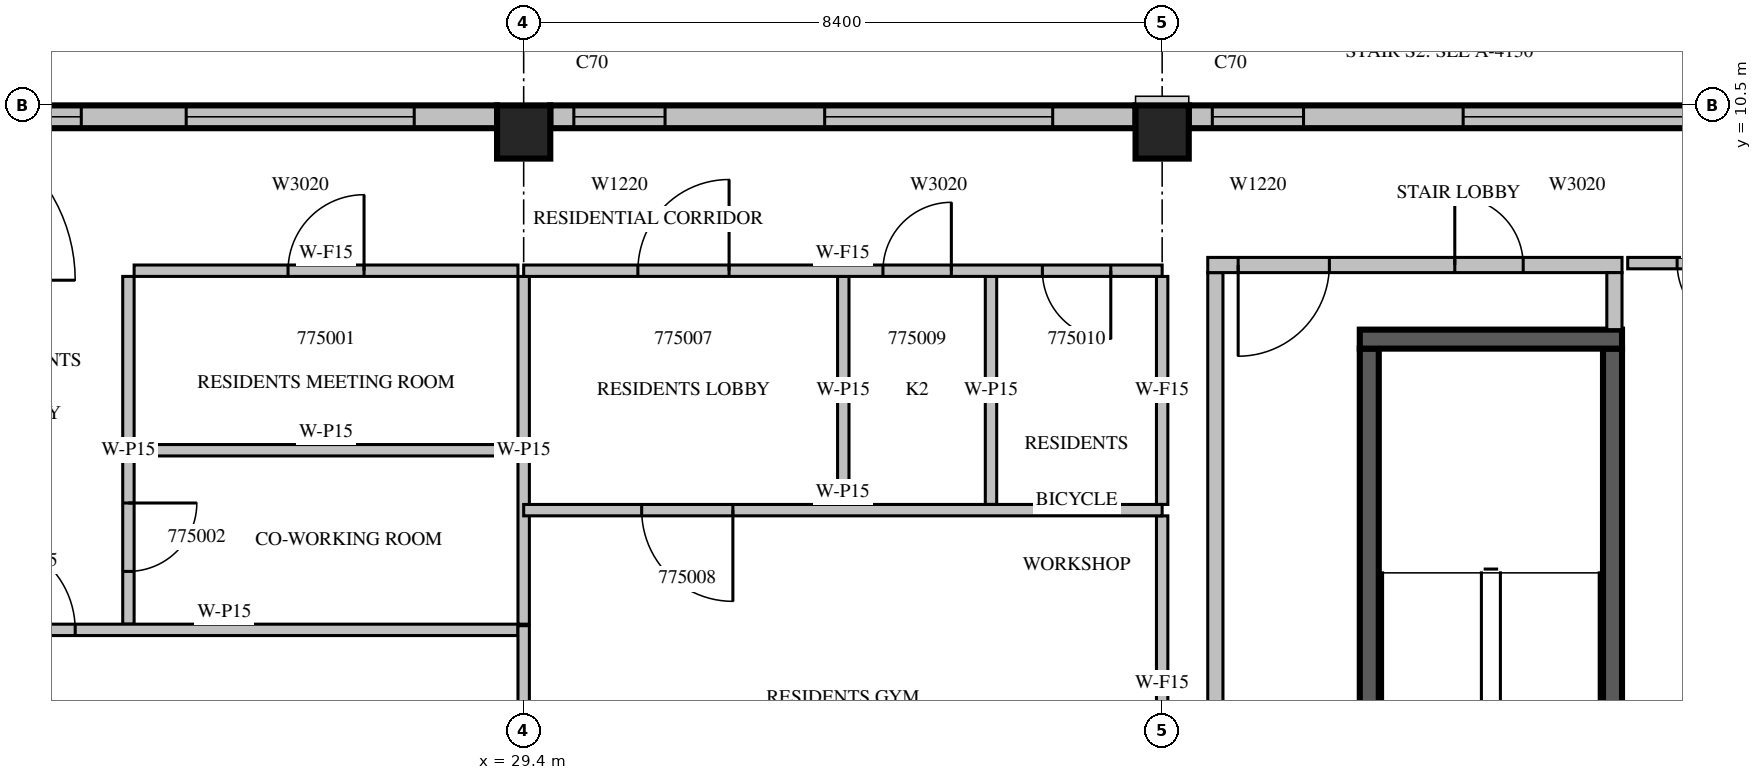
"""IFC4 building model, lengths in metres.
Left out: names, types, materials, properties, quantities, classifications, styles, units other than length and angle.
Written with IfcOpenShell. Run it as: python <this file> out.ifc"""

import sys

from ifc_helpers import new_model, si_unit, direction, frame, frame_2d, origin, origin_2d, place, context, subcontext, project, spatial, rectangle, extrude, source, transform, mapped, element, fill, save


model = new_model("IFC4")
c1 = context("Model", 3, precision=1e-05, world=origin(), true_north=direction((0.0, 1.0)))
c2 = subcontext(c1, "Body", "Model", "MODEL_VIEW")
j1 = project(units=[si_unit("LENGTHUNIT", "METRE"), si_unit("PLANEANGLEUNIT", "RADIAN")], contexts=[c1])
p1 = place(None, origin())
s1 = spatial("IfcSite", under=j1, at=p1, CompositionType="ELEMENT")
p2 = place(p1, origin())
s2 = spatial("IfcBuilding", under=s1, at=p2, CompositionType="ELEMENT")
p3 = place(p2, frame((0.0, 0.0, 323.0)))
s3 = spatial("IfcBuildingStorey", under=s2, at=p3, CompositionType="ELEMENT", Elevation=323.0)
m1 = source(origin(), c2, "Body", "SweptSolid", [
    extrude(rectangle(XDim=0.7, YDim=0.7, at=origin_2d()), origin(), (0.0, 0.0, 1.0), 3.5),
])
for number, where, z_axis, x_axis in (
    (1, (29.4, 10.15, 0.0), (0.0, 0.0, 1.0), (1.0, 0.0, 0.0)),
    (2, (37.8, 10.15, 0.0), (0.0, 0.0, 1.0), (1.0, 0.0, 0.0)),
):
    element("IfcColumn", number, at=place(p3, frame(where, z_axis=z_axis, x_axis=x_axis)), inside=s3, PredefinedType="COLUMN", context=c2, shape_type="MappedRepresentation", body=[
        mapped(m1, transform((0.0, 0.0, 0.0), scale=1.0)),
    ])
m2 = source(origin(), c2, "Body", "SweptSolid", [
    extrude(rectangle(XDim=7.7, YDim=0.3, at=frame_2d((3.85, 0.0))), origin(), (0.0, 0.0, 1.0), 3.1),
])
p4 = place(p3, frame((45.85, 10.35, 0.0), z_axis=(0.0, 0.0, 1.0), x_axis=(-1.0, 0.0, 0.0)))
e3 = element("IfcWall", 3, at=p4, inside=s3, PredefinedType="STANDARD", context=c2, shape_type="MappedRepresentation", body=[
    mapped(m2, transform((0.0, 0.0, 0.0), scale=1.0)),
])
m3 = source(origin(), c2, "Body", "SweptSolid", [
    extrude(rectangle(XDim=3.0, YDim=2.0, at=frame_2d((1.5, 1.0))), frame((0.0, 0.16, 0.0), z_axis=(0.0, -1.0, 0.0), x_axis=(1.0, 0.0, 0.0)), (0.0, 0.0, 1.0), 0.32),
])
p5 = place(p4, frame((1.09, 0.0, 0.6)))
e4 = element("IfcOpeningElement", 4, at=p5, cuts=e3, PredefinedType="OPENING", context=c2, shape_type="MappedRepresentation", body=[
    mapped(m3, transform((0.0, 0.0, 0.0), scale=1.0)),
])
m4 = source(origin(), c2, "Body", "SweptSolid", [
    extrude(rectangle(XDim=1.2, YDim=2.0, at=frame_2d((0.6, 1.0))), frame((0.0, 0.16, 0.0), z_axis=(0.0, -1.0, 0.0), x_axis=(1.0, 0.0, 0.0)), (0.0, 0.0, 1.0), 0.32),
])
p6 = place(p4, frame((6.19, 0.0, 0.6)))
e5 = element("IfcOpeningElement", 5, at=p6, cuts=e3, PredefinedType="OPENING", context=c2, shape_type="MappedRepresentation", body=[
    mapped(m4, transform((0.0, 0.0, 0.0), scale=1.0)),
])
p7 = place(p3, frame((37.45, 10.35, 0.0), z_axis=(0.0, 0.0, 1.0), x_axis=(-1.0, 0.0, 0.0)))
e6 = element("IfcWall", 6, at=p7, inside=s3, PredefinedType="STANDARD", context=c2, shape_type="MappedRepresentation", body=[
    mapped(m2, transform((0.0, 0.0, 0.0), scale=1.0)),
])
p8 = place(p7, frame((1.09, 0.0, 0.6)))
e7 = element("IfcOpeningElement", 7, at=p8, cuts=e6, PredefinedType="OPENING", context=c2, shape_type="MappedRepresentation", body=[
    mapped(m3, transform((0.0, 0.0, 0.0), scale=1.0)),
])
p9 = place(p7, frame((6.19, 0.0, 0.6)))
e8 = element("IfcOpeningElement", 8, at=p9, cuts=e6, PredefinedType="OPENING", context=c2, shape_type="MappedRepresentation", body=[
    mapped(m4, transform((0.0, 0.0, 0.0), scale=1.0)),
])
m5 = source(origin(), c2, "Body", "SweptSolid", [
    extrude(rectangle(XDim=7.45, YDim=0.3, at=frame_2d((3.725, 0.0))), origin(), (0.0, 0.0, 1.0), 3.1),
])
p10 = place(p3, frame((29.05, 10.35, 0.0), z_axis=(0.0, 0.0, 1.0), x_axis=(-1.0, 0.0, 0.0)))
e9 = element("IfcWall", 9, at=p10, inside=s3, PredefinedType="STANDARD", context=c2, shape_type="MappedRepresentation", body=[
    mapped(m5, transform((0.0, 0.0, 0.0), scale=1.0)),
])
p11 = place(p10, frame((1.09, 0.0, 0.6)))
e10 = element("IfcOpeningElement", 10, at=p11, cuts=e9, PredefinedType="OPENING", context=c2, shape_type="MappedRepresentation", body=[
    mapped(m3, transform((0.0, 0.0, 0.0), scale=1.0)),
])
m6 = source(origin(), c2, "Body", "SweptSolid", [
    extrude(rectangle(XDim=1.8, YDim=2.0, at=frame_2d((0.9, 1.0))), frame((0.0, 0.16, 0.0), z_axis=(0.0, -1.0, 0.0), x_axis=(1.0, 0.0, 0.0)), (0.0, 0.0, 1.0), 0.32),
])
p12 = place(p10, frame((5.47, 0.0, 0.6)))
e11 = element("IfcOpeningElement", 11, at=p12, cuts=e9, PredefinedType="OPENING", context=c2, shape_type="MappedRepresentation", body=[
    mapped(m6, transform((0.0, 0.0, 0.0), scale=1.0)),
])
m7 = source(origin(), c2, "Body", "SweptSolid", [
    extrude(rectangle(XDim=7.0, YDim=0.25, at=frame_2d((3.5, 0.0))), origin(), (0.0, 0.0, 1.0), 3.1),
])
p13 = place(p3, frame((40.525, 0.3, 0.0), z_axis=(0.0, 0.0, 1.0), x_axis=(0.0, 1.0, 0.0)))
e12 = element("IfcWall", 12, at=p13, inside=s3, PredefinedType="SOLIDWALL", context=c2, shape_type="MappedRepresentation", body=[
    mapped(m7, transform((0.0, 0.0, 0.0), scale=1.0)),
])
m8 = source(origin(), c2, "Body", "SweptSolid", [
    extrude(rectangle(XDim=1.1, YDim=2.1, at=frame_2d((0.55, 1.05))), frame((0.0, 0.135, 0.0), z_axis=(0.0, -1.0, 0.0), x_axis=(1.0, 0.0, 0.0)), (0.0, 0.0, 1.0), 0.27),
])
p14 = place(p13, frame((0.55, 0.0, 0.0)))
e13 = element("IfcOpeningElement", 13, at=p14, cuts=e12, PredefinedType="OPENING", context=c2, shape_type="MappedRepresentation", body=[
    mapped(m8, transform((0.0, 0.0, 0.0), scale=1.0)),
])
p15 = place(p3, frame((43.725, 0.3, 0.0), z_axis=(0.0, 0.0, 1.0), x_axis=(0.0, 1.0, 0.0)))
e14 = element("IfcWall", 14, at=p15, inside=s3, PredefinedType="SOLIDWALL", context=c2, shape_type="MappedRepresentation", body=[
    mapped(m7, transform((0.0, 0.0, 0.0), scale=1.0)),
])
m9 = source(origin(), c2, "Body", "SweptSolid", [
    extrude(rectangle(XDim=3.45, YDim=0.25, at=frame_2d((1.725, 0.0))), origin(), (0.0, 0.0, 1.0), 3.1),
])
p16 = place(p3, frame((40.4, 7.425, 0.0), z_axis=(0.0, 0.0, 1.0), x_axis=(1.0, 0.0, 0.0)))
e15 = element("IfcWall", 15, at=p16, inside=s3, PredefinedType="SOLIDWALL", context=c2, shape_type="MappedRepresentation", body=[
    mapped(m9, transform((0.0, 0.0, 0.0), scale=1.0)),
])
m10 = source(origin(), c2, "Body", "SweptSolid", [
    extrude(rectangle(XDim=8.0, YDim=0.2, at=frame_2d((4.0, 0.0))), origin(), (0.0, 0.0, 1.0), 3.1),
])
p17 = place(p3, frame((38.5, 0.3, 0.0), z_axis=(0.0, 0.0, 1.0), x_axis=(0.0, 1.0, 0.0)))
e16 = element("IfcWall", 16, at=p17, inside=s3, PredefinedType="PARTITIONING", context=c2, shape_type="MappedRepresentation", body=[
    mapped(m10, transform((0.0, 0.0, 0.0), scale=1.0)),
])
m11 = source(origin(), c2, "Body", "SweptSolid", [
    extrude(rectangle(XDim=5.45, YDim=0.2, at=frame_2d((2.725, 0.0))), origin(), (0.0, 0.0, 1.0), 3.1),
])
p18 = place(p3, frame((38.4, 8.4, 0.0), z_axis=(0.0, 0.0, 1.0), x_axis=(1.0, 0.0, 0.0)))
e17 = element("IfcWall", 17, at=p18, inside=s3, PredefinedType="PARTITIONING", context=c2, shape_type="MappedRepresentation", body=[
    mapped(m11, transform((0.0, 0.0, 0.0), scale=1.0)),
])
m12 = source(origin(), c2, "Body", "SweptSolid", [
    extrude(rectangle(XDim=1.2, YDim=2.1, at=frame_2d((0.6, 1.05))), frame((0.0, 0.11, 0.0), z_axis=(0.0, -1.0, 0.0), x_axis=(1.0, 0.0, 0.0)), (0.0, 0.0, 1.0), 0.22),
])
p19 = place(p18, frame((0.4, 0.0, 0.0)))
e18 = element("IfcOpeningElement", 18, at=p19, cuts=e17, PredefinedType="OPENING", context=c2, shape_type="MappedRepresentation", body=[
    mapped(m12, transform((0.0, 0.0, 0.0), scale=1.0)),
])
m13 = source(origin(), c2, "Body", "SweptSolid", [
    extrude(rectangle(XDim=0.9, YDim=2.1, at=frame_2d((0.45, 1.05))), frame((0.0, 0.11, 0.0), z_axis=(0.0, -1.0, 0.0), x_axis=(1.0, 0.0, 0.0)), (0.0, 0.0, 1.0), 0.22),
])
p20 = place(p18, frame((3.25, 0.0, 0.0)))
e19 = element("IfcOpeningElement", 19, at=p20, cuts=e17, PredefinedType="OPENING", context=c2, shape_type="MappedRepresentation", body=[
    mapped(m13, transform((0.0, 0.0, 0.0), scale=1.0)),
])
m14 = source(origin(), c2, "Body", "SweptSolid", [
    extrude(rectangle(XDim=0.75, YDim=0.2, at=frame_2d((0.375, 0.0))), origin(), (0.0, 0.0, 1.0), 3.1),
])
p21 = place(p3, frame((43.75, 7.55, 0.0), z_axis=(0.0, 0.0, 1.0), x_axis=(0.0, 1.0, 0.0)))
e20 = element("IfcWall", 20, at=p21, inside=s3, PredefinedType="PARTITIONING", context=c2, shape_type="MappedRepresentation", body=[
    mapped(m14, transform((0.0, 0.0, 0.0), scale=1.0)),
])
m15 = source(origin(), c2, "Body", "SweptSolid", [
    extrude(rectangle(XDim=4.575, YDim=0.15, at=frame_2d((2.288, 0.0))), origin(), (0.0, 0.0, 1.0), 3.1),
])
p22 = place(p3, frame((24.2, 8.25, 0.0), z_axis=(0.0, 0.0, 1.0), x_axis=(0.0, -1.0, 0.0)))
e21 = element("IfcWall", 21, at=p22, inside=s3, PredefinedType="PARTITIONING", context=c2, shape_type="MappedRepresentation", body=[
    mapped(m15, transform((0.0, 0.0, 0.0), scale=1.0)),
])
m16 = source(origin(), c2, "Body", "SweptSolid", [
    extrude(rectangle(XDim=0.9, YDim=2.1, at=frame_2d((0.45, 1.05))), frame((0.0, 0.085, 0.0), z_axis=(0.0, -1.0, 0.0), x_axis=(1.0, 0.0, 0.0)), (0.0, 0.0, 1.0), 0.17),
])
p23 = place(p22, frame((2.981, 0.0, 0.0)))
e22 = element("IfcOpeningElement", 22, at=p23, cuts=e21, PredefinedType="OPENING", context=c2, shape_type="MappedRepresentation", body=[
    mapped(m16, transform((0.0, 0.0, 0.0), scale=1.0)),
])
p24 = place(p3, frame((29.4, 3.675, 0.0), z_axis=(0.0, 0.0, 1.0), x_axis=(0.0, 1.0, 0.0)))
e23 = element("IfcWall", 23, at=p24, inside=s3, PredefinedType="PARTITIONING", context=c2, shape_type="MappedRepresentation", body=[
    mapped(m15, transform((0.0, 0.0, 0.0), scale=1.0)),
])
m17 = source(origin(), c2, "Body", "SweptSolid", [
    extrude(rectangle(XDim=5.05, YDim=0.15, at=frame_2d((2.525, 0.0))), origin(), (0.0, 0.0, 1.0), 3.1),
])
p25 = place(p3, frame((29.325, 8.325, 0.0), z_axis=(0.0, 0.0, 1.0), x_axis=(-1.0, 0.0, 0.0)))
e24 = element("IfcWall", 24, at=p25, inside=s3, PredefinedType="PARTITIONING", context=c2, shape_type="MappedRepresentation", body=[
    mapped(m17, transform((0.0, 0.0, 0.0), scale=1.0)),
])
m18 = source(origin(), c2, "Body", "SweptSolid", [
    extrude(rectangle(XDim=1.0, YDim=2.1, at=frame_2d((0.5, 1.05))), frame((0.0, 0.085, 0.0), z_axis=(0.0, -1.0, 0.0), x_axis=(1.0, 0.0, 0.0)), (0.0, 0.0, 1.0), 0.17),
])
p26 = place(p25, frame((2.025, 0.0, 0.0)))
e25 = element("IfcOpeningElement", 25, at=p26, cuts=e24, PredefinedType="OPENING", context=c2, shape_type="MappedRepresentation", body=[
    mapped(m18, transform((0.0, 0.0, 0.0), scale=1.0)),
])
p27 = place(p3, frame((29.325, 5.963, 0.0), z_axis=(0.0, 0.0, 1.0), x_axis=(-1.0, 0.0, 0.0)))
e26 = element("IfcWall", 26, at=p27, inside=s3, PredefinedType="PARTITIONING", context=c2, shape_type="MappedRepresentation", body=[
    mapped(m17, transform((0.0, 0.0, 0.0), scale=1.0)),
])
m19 = source(origin(), c2, "Body", "SweptSolid", [
    extrude(rectangle(XDim=7.725, YDim=0.15, at=frame_2d((3.862, 0.0))), origin(), (0.0, 0.0, 1.0), 3.1),
])
p28 = place(p3, frame((21.6, 3.6, 0.0), z_axis=(0.0, 0.0, 1.0), x_axis=(1.0, 0.0, 0.0)))
e27 = element("IfcWall", 27, at=p28, inside=s3, PredefinedType="PARTITIONING", context=c2, shape_type="MappedRepresentation", body=[
    mapped(m19, transform((0.0, 0.0, 0.0), scale=1.0)),
])
m20 = source(origin(), c2, "Body", "SweptSolid", [
    extrude(rectangle(XDim=1.2, YDim=2.1, at=frame_2d((0.6, 1.05))), frame((0.0, 0.085, 0.0), z_axis=(0.0, -1.0, 0.0), x_axis=(1.0, 0.0, 0.0)), (0.0, 0.0, 1.0), 0.17),
])
p29 = place(p28, frame((0.7, 0.0, 0.0)))
e28 = element("IfcOpeningElement", 28, at=p29, cuts=e27, PredefinedType="OPENING", context=c2, shape_type="MappedRepresentation", body=[
    mapped(m20, transform((0.0, 0.0, 0.0), scale=1.0)),
])
m21 = source(origin(), c2, "Body", "SweptSolid", [
    extrude(rectangle(XDim=2.2, YDim=0.15, at=frame_2d((1.1, 0.0))), origin(), (0.0, 0.0, 1.0), 3.1),
])
p30 = place(p3, frame((46.125, 8.425, 0.0), z_axis=(0.0, 0.0, 1.0), x_axis=(-1.0, 0.0, 0.0)))
e29 = element("IfcWall", 29, at=p30, inside=s3, PredefinedType="PARTITIONING", context=c2, shape_type="MappedRepresentation", body=[
    mapped(m21, transform((0.0, 0.0, 0.0), scale=1.0)),
])
p31 = place(p30, frame((0.65, 0.0, 0.0)))
e30 = element("IfcOpeningElement", 30, at=p31, cuts=e29, PredefinedType="OPENING", context=c2, shape_type="MappedRepresentation", body=[
    mapped(m16, transform((0.0, 0.0, 0.0), scale=1.0)),
])
m22 = source(origin(), c2, "Body", "SweptSolid", [
    extrude(rectangle(XDim=3.0, YDim=0.15, at=frame_2d((1.5, 0.0))), origin(), (0.0, 0.0, 1.0), 3.1),
])
for number, where, z_axis, x_axis in (
    (31, (33.605, 5.25, 0.0), (0.0, 0.0, 1.0), (0.0, 1.0, 0.0)),
    (32, (35.548, 5.25, 0.0), (0.0, 0.0, 1.0), (0.0, 1.0, 0.0)),
):
    element("IfcWall", number, at=place(p3, frame(where, z_axis=z_axis, x_axis=x_axis)), inside=s3, PredefinedType="PARTITIONING", context=c2, shape_type="MappedRepresentation", body=[
        mapped(m22, transform((0.0, 0.0, 0.0), scale=1.0)),
    ])
m23 = source(origin(), c2, "Body", "SweptSolid", [
    extrude(rectangle(XDim=2.956, YDim=0.15, at=frame_2d((1.478, 0.0))), origin(), (0.0, 0.0, 1.0), 3.1),
])
p32 = place(p3, frame((29.4, 0.699, 0.0), z_axis=(0.0, 0.0, 1.0), x_axis=(0.0, 1.0, 0.0)))
e33 = element("IfcWall", 33, at=p32, inside=s3, PredefinedType="PARTITIONING", context=c2, shape_type="MappedRepresentation", body=[
    mapped(m23, transform((0.0, 0.0, 0.0), scale=1.0)),
])
m24 = source(origin(), c2, "Body", "SweptSolid", [
    extrude(rectangle(XDim=4.401, YDim=0.15, at=frame_2d((2.2, 0.0))), origin(), (0.0, 0.0, 1.0), 3.1),
])
p33 = place(p3, frame((37.8, 0.699, 0.0), z_axis=(0.0, 0.0, 1.0), x_axis=(0.0, 1.0, 0.0)))
e34 = element("IfcWall", 34, at=p33, inside=s3, PredefinedType="PARTITIONING", context=c2, shape_type="MappedRepresentation", body=[
    mapped(m24, transform((0.0, 0.0, 0.0), scale=1.0)),
])
p34 = place(p3, frame((37.8, 5.25, 0.0), z_axis=(0.0, 0.0, 1.0), x_axis=(0.0, 1.0, 0.0)))
e35 = element("IfcWall", 35, at=p34, inside=s3, PredefinedType="PARTITIONING", context=c2, shape_type="MappedRepresentation", body=[
    mapped(m22, transform((0.0, 0.0, 0.0), scale=1.0)),
])
m25 = source(origin(), c2, "Body", "SweptSolid", [
    extrude(rectangle(XDim=8.4, YDim=0.15, at=frame_2d((4.2, 0.0))), origin(), (0.0, 0.0, 1.0), 3.1),
])
p35 = place(p3, frame((37.8, 5.175, 0.0), z_axis=(0.0, 0.0, 1.0), x_axis=(-1.0, 0.0, 0.0)))
e36 = element("IfcWall", 36, at=p35, inside=s3, PredefinedType="PARTITIONING", context=c2, shape_type="MappedRepresentation", body=[
    mapped(m25, transform((0.0, 0.0, 0.0), scale=1.0)),
])
p36 = place(p35, frame((5.648, 0.0, 0.0)))
e37 = element("IfcOpeningElement", 37, at=p36, cuts=e36, PredefinedType="OPENING", context=c2, shape_type="MappedRepresentation", body=[
    mapped(m20, transform((0.0, 0.0, 0.0), scale=1.0)),
])
p37 = place(p3, frame((37.8, 8.325, 0.0), z_axis=(0.0, 0.0, 1.0), x_axis=(-1.0, 0.0, 0.0)))
e38 = element("IfcWall", 38, at=p37, inside=s3, PredefinedType="PARTITIONING", context=c2, shape_type="MappedRepresentation", body=[
    mapped(m25, transform((0.0, 0.0, 0.0), scale=1.0)),
])
p38 = place(p37, frame((5.698, 0.0, 0.0)))
e39 = element("IfcOpeningElement", 39, at=p38, cuts=e38, PredefinedType="OPENING", context=c2, shape_type="MappedRepresentation", body=[
    mapped(m20, transform((0.0, 0.0, 0.0), scale=1.0)),
])
p39 = place(p37, frame((2.773, 0.0, 0.0)))
e40 = element("IfcOpeningElement", 40, at=p39, cuts=e38, PredefinedType="OPENING", context=c2, shape_type="MappedRepresentation", body=[
    mapped(m16, transform((0.0, 0.0, 0.0), scale=1.0)),
])
p40 = place(p37, frame((0.676, 0.0, 0.0)))
e41 = element("IfcOpeningElement", 41, at=p40, cuts=e38, PredefinedType="OPENING", context=c2, shape_type="MappedRepresentation", body=[
    mapped(m16, transform((0.0, 0.0, 0.0), scale=1.0)),
])
m26 = source(origin(), c2, "Body", "SweptSolid", [
    extrude(rectangle(XDim=3.0, YDim=2.0, at=frame_2d((1.5, 1.0))), frame((0.0, 0.03, 0.0), z_axis=(0.0, -1.0, 0.0), x_axis=(1.0, 0.0, 0.0)), (0.0, 0.0, 1.0), 0.06),
])
p41 = place(p5, origin())
e42 = element("IfcWindow", 42, at=p41, inside=s3, PartitioningType="SINGLE_PANEL", PredefinedType="WINDOW", context=c2, shape_type="MappedRepresentation", body=[
    mapped(m26, transform((0.0, 0.0, 0.0), scale=1.0)),
])
fill(e4, e42)
m27 = source(origin(), c2, "Body", "SweptSolid", [
    extrude(rectangle(XDim=1.2, YDim=2.0, at=frame_2d((0.6, 1.0))), frame((0.0, 0.03, 0.0), z_axis=(0.0, -1.0, 0.0), x_axis=(1.0, 0.0, 0.0)), (0.0, 0.0, 1.0), 0.06),
])
p42 = place(p6, origin())
e43 = element("IfcWindow", 43, at=p42, inside=s3, PartitioningType="SINGLE_PANEL", PredefinedType="WINDOW", context=c2, shape_type="MappedRepresentation", body=[
    mapped(m27, transform((0.0, 0.0, 0.0), scale=1.0)),
])
fill(e5, e43)
p43 = place(p8, origin())
e44 = element("IfcWindow", 44, at=p43, inside=s3, PartitioningType="SINGLE_PANEL", PredefinedType="WINDOW", context=c2, shape_type="MappedRepresentation", body=[
    mapped(m26, transform((0.0, 0.0, 0.0), scale=1.0)),
])
fill(e7, e44)
p44 = place(p9, origin())
e45 = element("IfcWindow", 45, at=p44, inside=s3, PartitioningType="SINGLE_PANEL", PredefinedType="WINDOW", context=c2, shape_type="MappedRepresentation", body=[
    mapped(m27, transform((0.0, 0.0, 0.0), scale=1.0)),
])
fill(e8, e45)
p45 = place(p11, origin())
e46 = element("IfcWindow", 46, at=p45, inside=s3, PartitioningType="SINGLE_PANEL", PredefinedType="WINDOW", context=c2, shape_type="MappedRepresentation", body=[
    mapped(m26, transform((0.0, 0.0, 0.0), scale=1.0)),
])
fill(e10, e46)
m28 = source(origin(), c2, "Body", "SweptSolid", [
    extrude(rectangle(XDim=1.8, YDim=2.0, at=frame_2d((0.9, 1.0))), frame((0.0, 0.03, 0.0), z_axis=(0.0, -1.0, 0.0), x_axis=(1.0, 0.0, 0.0)), (0.0, 0.0, 1.0), 0.06),
])
p46 = place(p12, origin())
e47 = element("IfcWindow", 47, at=p46, inside=s3, PartitioningType="SINGLE_PANEL", PredefinedType="WINDOW", context=c2, shape_type="MappedRepresentation", body=[
    mapped(m28, transform((0.0, 0.0, 0.0), scale=1.0)),
])
fill(e11, e47)
m29 = source(origin(), c2, "Body", "SweptSolid", [
    extrude(rectangle(XDim=1.2, YDim=2.1, at=frame_2d((0.6, 1.05))), frame((0.0, 0.025, 0.0), z_axis=(0.0, -1.0, 0.0), x_axis=(1.0, 0.0, 0.0)), (0.0, 0.0, 1.0), 0.05),
])
p47 = place(p19, origin())
e48 = element("IfcDoor", 48, at=p47, inside=s3, OperationType="SINGLE_SWING_RIGHT", PredefinedType="DOOR", context=c2, shape_type="MappedRepresentation", body=[
    mapped(m29, transform((0.0, 0.0, 0.0), scale=1.0)),
])
fill(e18, e48)
m30 = source(origin(), c2, "Body", "SweptSolid", [
    extrude(rectangle(XDim=0.9, YDim=2.1, at=frame_2d((0.45, 1.05))), frame((0.0, 0.025, 0.0), z_axis=(0.0, -1.0, 0.0), x_axis=(1.0, 0.0, 0.0)), (0.0, 0.0, 1.0), 0.05),
])
p48 = place(p20, origin())
e49 = element("IfcDoor", 49, at=p48, inside=s3, OperationType="SINGLE_SWING_LEFT", PredefinedType="DOOR", context=c2, shape_type="MappedRepresentation", body=[
    mapped(m30, transform((0.0, 0.0, 0.0), scale=1.0)),
])
fill(e19, e49)
m31 = source(origin(), c2, "Body", "SweptSolid", [
    extrude(rectangle(XDim=1.0, YDim=2.1, at=frame_2d((0.5, 1.05))), frame((0.0, 0.025, 0.0), z_axis=(0.0, -1.0, 0.0), x_axis=(1.0, 0.0, 0.0)), (0.0, 0.0, 1.0), 0.05),
])
p49 = place(p26, origin())
e50 = element("IfcDoor", 50, at=p49, inside=s3, OperationType="SINGLE_SWING_RIGHT", PredefinedType="DOOR", context=c2, shape_type="MappedRepresentation", body=[
    mapped(m31, transform((0.0, 0.0, 0.0), scale=1.0)),
])
fill(e25, e50)
p50 = place(p23, origin())
e51 = element("IfcDoor", 51, at=p50, inside=s3, OperationType="SINGLE_SWING_LEFT", PredefinedType="DOOR", context=c2, shape_type="MappedRepresentation", body=[
    mapped(m30, transform((0.0, 0.0, 0.0), scale=1.0)),
])
fill(e22, e51)
p51 = place(p29, origin())
e52 = element("IfcDoor", 52, at=p51, inside=s3, OperationType="SINGLE_SWING_LEFT", PredefinedType="DOOR", context=c2, shape_type="MappedRepresentation", body=[
    mapped(m29, transform((0.0, 0.0, 0.0), scale=1.0)),
])
fill(e28, e52)
p52 = place(p31, origin())
e53 = element("IfcDoor", 53, at=p52, inside=s3, OperationType="SINGLE_SWING_LEFT", PredefinedType="DOOR", context=c2, shape_type="MappedRepresentation", body=[
    mapped(m30, transform((0.0, 0.0, 0.0), scale=1.0)),
])
fill(e30, e53)
p53 = place(p38, origin())
e54 = element("IfcDoor", 54, at=p53, inside=s3, OperationType="SINGLE_SWING_RIGHT", PredefinedType="DOOR", context=c2, shape_type="MappedRepresentation", body=[
    mapped(m29, transform((0.0, 0.0, 0.0), scale=1.0)),
])
fill(e39, e54)
p54 = place(p36, origin())
e55 = element("IfcDoor", 55, at=p54, inside=s3, OperationType="SINGLE_SWING_LEFT", PredefinedType="DOOR", context=c2, shape_type="MappedRepresentation", body=[
    mapped(m29, transform((0.0, 0.0, 0.0), scale=1.0)),
])
fill(e37, e55)
p55 = place(p39, origin())
e56 = element("IfcDoor", 56, at=p55, inside=s3, OperationType="SINGLE_SWING_RIGHT", PredefinedType="DOOR", context=c2, shape_type="MappedRepresentation", body=[
    mapped(m30, transform((0.0, 0.0, 0.0), scale=1.0)),
])
fill(e40, e56)
p56 = place(p40, origin())
e57 = element("IfcDoor", 57, at=p56, inside=s3, OperationType="SINGLE_SWING_LEFT", PredefinedType="DOOR", context=c2, shape_type="MappedRepresentation", body=[
    mapped(m30, transform((0.0, 0.0, 0.0), scale=1.0)),
])
fill(e41, e57)
save(model, sys.argv[1])
